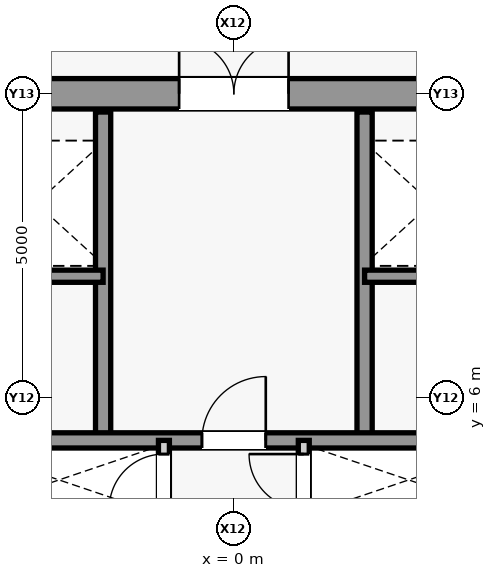
"""IFC4 building model, lengths in metres.
Left out: names, types, materials, properties, quantities, classifications, styles, units other than length and angle.
Written with IfcOpenShell. Run it as: python <this file> out.ifc"""

import sys

from ifc_helpers import new_model, si_unit, direction, frame, frame_2d, origin, place, context, subcontext, project, spatial, rectangle, extrude, source, transform, mapped, element, fill, save


model = new_model("IFC4")
c1 = context("Model", 3, precision=1e-05, world=origin(), true_north=direction((0.0, 1.0)))
c2 = subcontext(c1, "Body", "Model", "MODEL_VIEW")
j1 = project(units=[si_unit("LENGTHUNIT", "METRE"), si_unit("PLANEANGLEUNIT", "RADIAN")], contexts=[c1])
p1 = place(None, origin())
s1 = spatial("IfcSite", under=j1, at=p1, CompositionType="ELEMENT")
p2 = place(p1, origin())
s2 = spatial("IfcBuilding", under=s1, at=p2, CompositionType="ELEMENT")
p3 = place(p2, frame((0.0, 0.0, 103.7)))
s3 = spatial("IfcBuildingStorey", under=s2, at=p3, CompositionType="ELEMENT", Elevation=103.7)
m1 = source(origin(), c2, "Body", "SweptSolid", [
    extrude(rectangle(XDim=9.2, YDim=0.5, at=frame_2d((4.6, 0.0))), origin(), (0.0, 0.0, 1.0), 3.84),
])
p4 = place(p3, frame((-4.6, 11.0, 0.0), z_axis=(0.0, 0.0, 1.0), x_axis=(1.0, 0.0, 0.0)))
e1 = element("IfcWall", 1, at=p4, inside=s3, PredefinedType="SHEAR", context=c2, shape_type="MappedRepresentation", body=[
    mapped(m1, transform((0.0, 0.0, 0.0), scale=1.0)),
])
m2 = source(origin(), c2, "Body", "SweptSolid", [
    extrude(rectangle(XDim=1.8, YDim=2.25, at=frame_2d((0.9, 1.125))), frame((0.0, 0.26, 0.0), z_axis=(0.0, -1.0, 0.0), x_axis=(1.0, 0.0, 0.0)), (0.0, 0.0, 1.0), 0.52),
])
p5 = place(p4, frame((3.7, 0.0, 0.0)))
e2 = element("IfcOpeningElement", 2, at=p5, cuts=e1, PredefinedType="OPENING", context=c2, shape_type="MappedRepresentation", body=[
    mapped(m2, transform((0.0, 0.0, 0.0), scale=1.0)),
])
m3 = source(origin(), c2, "Body", "SweptSolid", [
    extrude(rectangle(XDim=5.4, YDim=0.25, at=frame_2d((2.7, 0.0))), origin(), (0.0, 0.0, 1.0), 3.84),
])
for number, where, z_axis, x_axis in (
    (3, (-2.15, 5.3, 0.0), (0.0, 0.0, 1.0), (0.0, 1.0, 0.0)),
    (4, (2.15, 5.3, 0.0), (0.0, 0.0, 1.0), (0.0, 1.0, 0.0)),
):
    element("IfcWall", number, at=place(p3, frame(where, z_axis=z_axis, x_axis=x_axis)), inside=s3, PredefinedType="SHEAR", context=c2, shape_type="MappedRepresentation", body=[
        mapped(m3, transform((0.0, 0.0, 0.0), scale=1.0)),
    ])
m4 = source(origin(), c2, "Body", "SweptSolid", [
    extrude(rectangle(XDim=2.45, YDim=0.2, at=frame_2d((1.225, 0.0))), origin(), (0.0, 0.0, 1.0), 3.84),
])
for number, where, z_axis, x_axis in (
    (5, (-4.6, 8.0, 0.0), (0.0, 0.0, 1.0), (1.0, 0.0, 0.0)),
    (6, (2.15, 8.0, 0.0), (0.0, 0.0, 1.0), (1.0, 0.0, 0.0)),
):
    element("IfcWall", number, at=place(p3, frame(where, z_axis=z_axis, x_axis=x_axis)), inside=s3, PredefinedType="SHEAR", context=c2, shape_type="MappedRepresentation", body=[
        mapped(m4, transform((0.0, 0.0, 0.0), scale=1.0)),
    ])
m5 = source(origin(), c2, "Body", "SweptSolid", [
    extrude(rectangle(XDim=9.2, YDim=0.25, at=frame_2d((4.6, 0.0))), origin(), (0.0, 0.0, 1.0), 3.84),
])
p6 = place(p3, frame((-4.6, 5.3, 0.0), z_axis=(0.0, 0.0, 1.0), x_axis=(1.0, 0.0, 0.0)))
e7 = element("IfcWall", 7, at=p6, inside=s3, PredefinedType="SHEAR", context=c2, shape_type="MappedRepresentation", body=[
    mapped(m5, transform((0.0, 0.0, 0.0), scale=1.0)),
])
m6 = source(origin(), c2, "Body", "SweptSolid", [
    extrude(rectangle(XDim=1.05, YDim=2.2, at=frame_2d((0.525, 1.1))), frame((0.0, 0.135, 0.0), z_axis=(0.0, -1.0, 0.0), x_axis=(1.0, 0.0, 0.0)), (0.0, 0.0, 1.0), 0.27),
])
p7 = place(p6, frame((4.075, 0.0, 0.0)))
e8 = element("IfcOpeningElement", 8, at=p7, cuts=e7, PredefinedType="OPENING", context=c2, shape_type="MappedRepresentation", body=[
    mapped(m6, transform((0.0, 0.0, 0.0), scale=1.0)),
])
m7 = source(origin(), c2, "Body", "SweptSolid", [
    extrude(rectangle(XDim=10.6, YDim=0.18, at=frame_2d((5.3, 0.0))), origin(), (0.0, 0.0, 1.0), 3.84),
])
p8 = place(p3, frame((-1.15, -5.3, 0.0), z_axis=(0.0, 0.0, 1.0), x_axis=(0.0, 1.0, 0.0)))
e9 = element("IfcWall", 9, at=p8, inside=s3, PredefinedType="PARTITIONING", context=c2, shape_type="MappedRepresentation", body=[
    mapped(m7, transform((0.0, 0.0, 0.0), scale=1.0)),
])
m8 = source(origin(), c2, "Body", "SweptSolid", [
    extrude(rectangle(XDim=0.9, YDim=2.15, at=frame_2d((0.45, 1.075))), frame((0.0, 0.1, 0.0), z_axis=(0.0, -1.0, 0.0), x_axis=(1.0, 0.0, 0.0)), (0.0, 0.0, 1.0), 0.2),
])
p9 = place(p8, frame((0.9, 0.0, 0.0)))
e10 = element("IfcOpeningElement", 10, at=p9, cuts=e9, PredefinedType="OPENING", context=c2, shape_type="MappedRepresentation", body=[
    mapped(m8, transform((0.0, 0.0, 0.0), scale=1.0)),
])
p10 = place(p8, frame((3.65, 0.0, 0.0)))
e11 = element("IfcOpeningElement", 11, at=p10, cuts=e9, PredefinedType="OPENING", context=c2, shape_type="MappedRepresentation", body=[
    mapped(m8, transform((0.0, 0.0, 0.0), scale=1.0)),
])
p11 = place(p8, frame((6.35, 0.0, 0.0)))
e12 = element("IfcOpeningElement", 12, at=p11, cuts=e9, PredefinedType="OPENING", context=c2, shape_type="MappedRepresentation", body=[
    mapped(m8, transform((0.0, 0.0, 0.0), scale=1.0)),
])
p12 = place(p8, frame((8.25, 0.0, 0.0)))
e13 = element("IfcOpeningElement", 13, at=p12, cuts=e9, PredefinedType="OPENING", context=c2, shape_type="MappedRepresentation", body=[
    mapped(m8, transform((0.0, 0.0, 0.0), scale=1.0)),
])
p13 = place(p8, frame((9.475, 0.0, 0.0)))
e14 = element("IfcOpeningElement", 14, at=p13, cuts=e9, PredefinedType="OPENING", context=c2, shape_type="MappedRepresentation", body=[
    mapped(m8, transform((0.0, 0.0, 0.0), scale=1.0)),
])
p14 = place(p3, frame((1.15, -5.3, 0.0), z_axis=(0.0, 0.0, 1.0), x_axis=(0.0, 1.0, 0.0)))
e15 = element("IfcWall", 15, at=p14, inside=s3, PredefinedType="PARTITIONING", context=c2, shape_type="MappedRepresentation", body=[
    mapped(m7, transform((0.0, 0.0, 0.0), scale=1.0)),
])
p15 = place(p14, frame((2.6, 0.0, 0.0)))
e16 = element("IfcOpeningElement", 16, at=p15, cuts=e15, PredefinedType="OPENING", context=c2, shape_type="MappedRepresentation", body=[
    mapped(m8, transform((0.0, 0.0, 0.0), scale=1.0)),
])
p16 = place(p14, frame((7.25, 0.0, 0.0)))
e17 = element("IfcOpeningElement", 17, at=p16, cuts=e15, PredefinedType="OPENING", context=c2, shape_type="MappedRepresentation", body=[
    mapped(m8, transform((0.0, 0.0, 0.0), scale=1.0)),
])
p17 = place(p14, frame((9.475, 0.0, 0.0)))
e18 = element("IfcOpeningElement", 18, at=p17, cuts=e15, PredefinedType="OPENING", context=c2, shape_type="MappedRepresentation", body=[
    mapped(m8, transform((0.0, 0.0, 0.0), scale=1.0)),
])
m9 = source(origin(), c2, "Body", "SweptSolid", [
    extrude(rectangle(XDim=1.05, YDim=2.2, at=frame_2d((0.525, 1.1))), frame((0.0, 0.025, 0.0), z_axis=(0.0, -1.0, 0.0), x_axis=(1.0, 0.0, 0.0)), (0.0, 0.0, 1.0), 0.05),
])
p18 = place(p7, origin())
e19 = element("IfcDoor", 19, at=p18, inside=s3, OperationType="SINGLE_SWING_RIGHT", PredefinedType="DOOR", context=c2, shape_type="MappedRepresentation", body=[
    mapped(m9, transform((0.0, 0.0, 0.0), scale=1.0)),
])
fill(e8, e19)
m10 = source(origin(), c2, "Body", "SweptSolid", [
    extrude(rectangle(XDim=1.8, YDim=2.25, at=frame_2d((0.9, 1.125))), frame((0.0, 0.025, 0.0), z_axis=(0.0, -1.0, 0.0), x_axis=(1.0, 0.0, 0.0)), (0.0, 0.0, 1.0), 0.05),
])
p19 = place(p5, origin())
e20 = element("IfcDoor", 20, at=p19, inside=s3, OperationType="SINGLE_SWING_RIGHT", PredefinedType="DOOR", context=c2, shape_type="MappedRepresentation", body=[
    mapped(m10, transform((0.0, 0.0, 0.0), scale=1.0)),
])
fill(e2, e20)
m11 = source(origin(), c2, "Body", "SweptSolid", [
    extrude(rectangle(XDim=0.9, YDim=2.15, at=frame_2d((0.45, 1.075))), frame((0.0, 0.025, 0.0), z_axis=(0.0, -1.0, 0.0), x_axis=(1.0, 0.0, 0.0)), (0.0, 0.0, 1.0), 0.05),
])
p20 = place(p13, origin())
e21 = element("IfcDoor", 21, at=p20, inside=s3, OperationType="SINGLE_SWING_LEFT", PredefinedType="DOOR", context=c2, shape_type="MappedRepresentation", body=[
    mapped(m11, transform((0.0, 0.0, 0.0), scale=1.0)),
])
fill(e14, e21)
p21 = place(p17, origin())
e22 = element("IfcDoor", 22, at=p21, inside=s3, OperationType="SINGLE_SWING_RIGHT", PredefinedType="DOOR", context=c2, shape_type="MappedRepresentation", body=[
    mapped(m11, transform((0.0, 0.0, 0.0), scale=1.0)),
])
fill(e18, e22)
save(model, sys.argv[1])
